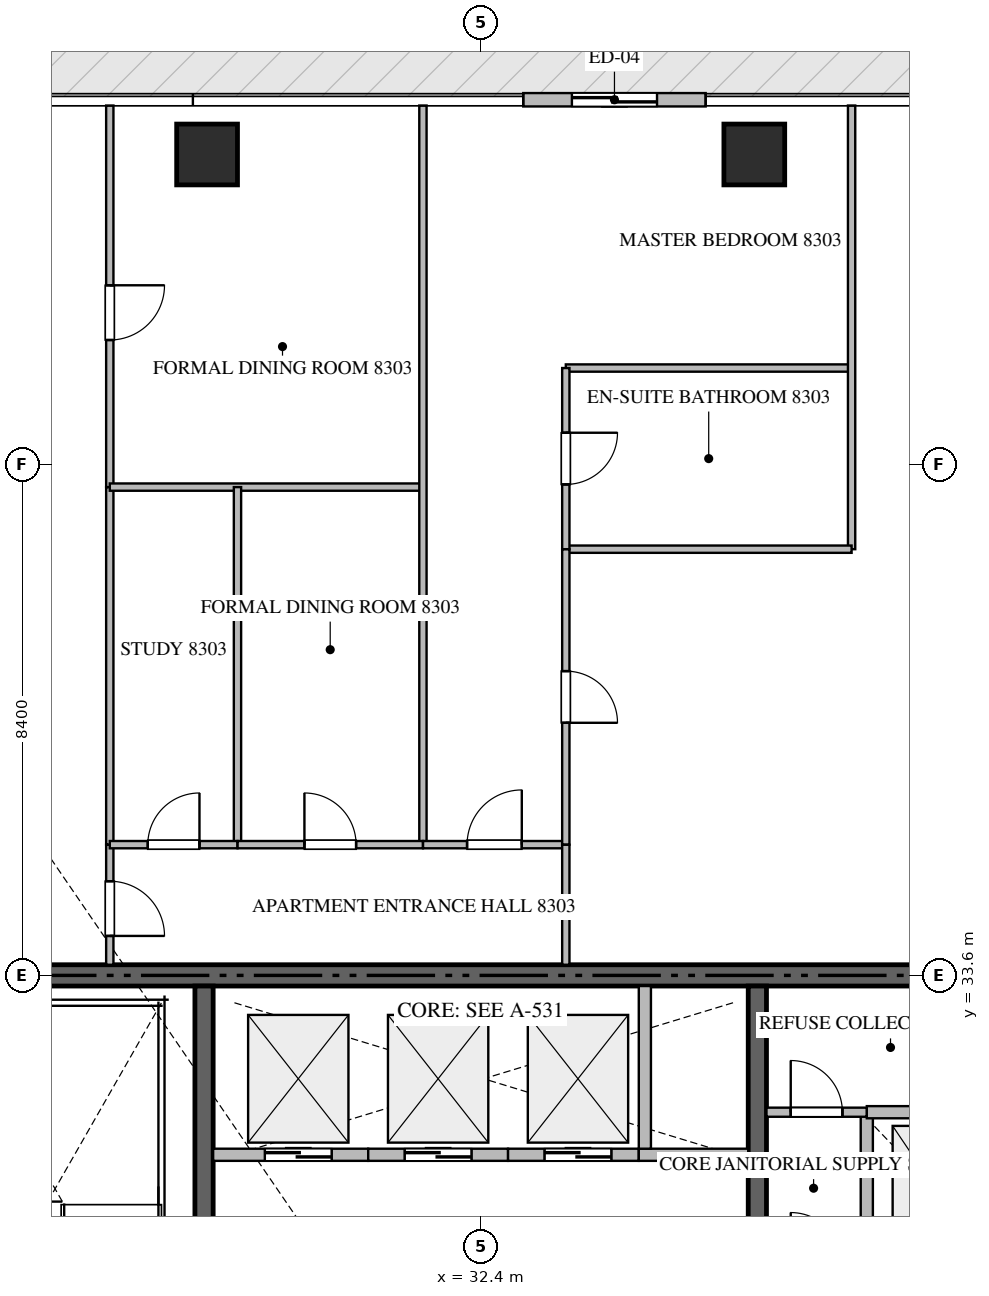
"""IFC4 building model, lengths in metres.
Left out: names, types, materials, properties, quantities, classifications, styles, units other than length and angle.
Written with IfcOpenShell. Run it as: python <this file> out.ifc"""

import sys

from ifc_helpers import new_model, si_unit, direction, frame, frame_2d, origin, origin_2d, place, context, subcontext, project, spatial, rectangle, extrude, source, transform, mapped, element, fill, save


model = new_model("IFC4")
c1 = context("Model", 3, precision=1e-05, world=origin(), true_north=direction((0.0, 1.0)))
c2 = subcontext(c1, "Body", "Model", "MODEL_VIEW")
j1 = project(units=[si_unit("LENGTHUNIT", "METRE"), si_unit("PLANEANGLEUNIT", "RADIAN")], contexts=[c1])
p1 = place(None, origin())
s1 = spatial("IfcSite", under=j1, at=p1, CompositionType="ELEMENT")
p2 = place(p1, origin())
s2 = spatial("IfcBuilding", under=s1, at=p2, CompositionType="ELEMENT")
p3 = place(p2, frame((0.0, 0.0, 333.95)))
s3 = spatial("IfcBuildingStorey", under=s2, at=p3, CompositionType="ELEMENT", Elevation=333.95)
p4 = place(p3, frame((41.4, 33.6, -0.26), z_axis=(0.0, 0.0, 1.0), x_axis=(-1.0, 0.0, 0.0)))
e1 = element("IfcWall", 1, at=p4, inside=s3, PredefinedType="SHEAR", context=c2, shape_type="SweptSolid", body=[
    extrude(rectangle(XDim=18.0, YDim=0.35, at=frame_2d((9.0, 0.0))), origin(), (0.0, 0.0, 1.0), 3.868),
])
p5 = place(p3, frame((27.85, 23.55, -0.26), z_axis=(0.0, 0.0, 1.0), x_axis=(0.0, 1.0, 0.0)))
e2 = element("IfcWall", 2, at=p5, inside=s3, PredefinedType="SHEAR", context=c2, shape_type="SweptSolid", body=[
    extrude(rectangle(XDim=9.875, YDim=0.3, at=frame_2d((4.938, 0.0))), origin(), (0.0, 0.0, 1.0), 3.868),
])
p6 = place(p3, frame((36.95, 27.05, -0.26), z_axis=(0.0, 0.0, 1.0), x_axis=(0.0, 1.0, 0.0)))
e3 = element("IfcWall", 3, at=p6, inside=s3, PredefinedType="SHEAR", context=c2, shape_type="SweptSolid", body=[
    extrude(rectangle(XDim=6.375, YDim=0.3, at=frame_2d((3.188, 0.0))), origin(), (0.0, 0.0, 1.0), 3.868),
])
m1 = source(origin(), c2, "Body", "SweptSolid", [
    extrude(rectangle(XDim=1.0, YDim=1.0, at=origin_2d()), origin(), (0.0, 0.0, 1.0), 3.87),
])
for number, where, z_axis, x_axis in (
    (4, (27.9, 47.1, -0.26), (0.0, 0.0, 1.0), (1.0, 0.0, 0.0)),
    (5, (36.9, 47.1, -0.26), (0.0, 0.0, 1.0), (1.0, 0.0, 0.0)),
):
    element("IfcColumn", number, at=place(p3, frame(where, z_axis=z_axis, x_axis=x_axis)), inside=s3, PredefinedType="COLUMN", context=c2, shape_type="MappedRepresentation", body=[
        mapped(m1, transform((0.0, 0.0, 0.0), scale=1.0)),
    ])
p7 = place(p3, frame((36.1, 48.0, 0.0), z_axis=(0.0, 0.0, 1.0), x_axis=(-1.0, 0.0, 0.0)))
e6 = element("IfcWall", 6, at=p7, inside=s3, PredefinedType="ELEMENTEDWALL", context=c2, shape_type="SweptSolid", body=[
    extrude(rectangle(XDim=3.0, YDim=0.22, at=frame_2d((1.5, 0.0))), origin(), (0.0, 0.0, 1.0), 3.595),
])
p8 = place(p7, frame((0.8, 0.0, 0.0)))
e7 = element("IfcOpeningElement", 7, at=p8, cuts=e6, PredefinedType="OPENING", context=c2, shape_type="SweptSolid", body=[
    extrude(rectangle(XDim=1.4, YDim=2.25, at=frame_2d((0.7, 1.125))), frame((0.0, 0.12, 0.0), z_axis=(0.0, -1.0, 0.0), x_axis=(1.0, 0.0, 0.0)), (0.0, 0.0, 1.0), 0.24),
])
p9 = place(p3, frame((28.0, 30.65, 0.0), z_axis=(0.0, 0.0, 1.0), x_axis=(1.0, 0.0, 0.0)))
e8 = element("IfcWall", 8, at=p9, inside=s3, PredefinedType="STANDARD", context=c2, shape_type="SweptSolid", body=[
    extrude(rectangle(XDim=2.55, YDim=0.2, at=frame_2d((1.275, 0.0))), origin(), (0.0, 0.0, 1.0), 3.61),
])
p10 = place(p9, frame((0.85, 0.0, 0.0)))
e9 = element("IfcOpeningElement", 9, at=p10, cuts=e8, PredefinedType="OPENING", context=c2, shape_type="SweptSolid", body=[
    extrude(rectangle(XDim=1.1, YDim=2.2, at=frame_2d((0.55, 1.1))), frame((0.0, 0.11, 0.0), z_axis=(0.0, -1.0, 0.0), x_axis=(1.0, 0.0, 0.0)), (0.0, 0.0, 1.0), 0.22),
])
p11 = place(p3, frame((30.55, 30.65, 0.0), z_axis=(0.0, 0.0, 1.0), x_axis=(1.0, 0.0, 0.0)))
e10 = element("IfcWall", 10, at=p11, inside=s3, PredefinedType="STANDARD", context=c2, shape_type="SweptSolid", body=[
    extrude(rectangle(XDim=2.3, YDim=0.2, at=frame_2d((1.15, 0.0))), origin(), (0.0, 0.0, 1.0), 3.61),
])
p12 = place(p11, frame((0.6, 0.0, 0.0)))
e11 = element("IfcOpeningElement", 11, at=p12, cuts=e10, PredefinedType="OPENING", context=c2, shape_type="SweptSolid", body=[
    extrude(rectangle(XDim=1.1, YDim=2.2, at=frame_2d((0.55, 1.1))), frame((0.0, 0.11, 0.0), z_axis=(0.0, -1.0, 0.0), x_axis=(1.0, 0.0, 0.0)), (0.0, 0.0, 1.0), 0.22),
])
p13 = place(p3, frame((32.85, 30.65, 0.0), z_axis=(0.0, 0.0, 1.0), x_axis=(1.0, 0.0, 0.0)))
e12 = element("IfcWall", 12, at=p13, inside=s3, PredefinedType="STANDARD", context=c2, shape_type="SweptSolid", body=[
    extrude(rectangle(XDim=2.15, YDim=0.2, at=frame_2d((1.075, 0.0))), origin(), (0.0, 0.0, 1.0), 3.61),
])
p14 = place(p13, frame((0.6, 0.0, 0.0)))
e13 = element("IfcOpeningElement", 13, at=p14, cuts=e12, PredefinedType="OPENING", context=c2, shape_type="SweptSolid", body=[
    extrude(rectangle(XDim=1.1, YDim=2.2, at=frame_2d((0.55, 1.1))), frame((0.0, 0.11, 0.0), z_axis=(0.0, -1.0, 0.0), x_axis=(1.0, 0.0, 0.0)), (0.0, 0.0, 1.0), 0.22),
])
p15 = place(p3, frame((35.0, 30.65, 0.0), z_axis=(0.0, 0.0, 1.0), x_axis=(1.0, 0.0, 0.0)))
e14 = element("IfcWall", 14, at=p15, inside=s3, PredefinedType="STANDARD", context=c2, shape_type="SweptSolid", body=[
    extrude(rectangle(XDim=1.8, YDim=0.2, at=frame_2d((0.9, 0.0))), origin(), (0.0, 0.0, 1.0), 3.61),
])
p16 = place(p3, frame((35.1, 30.75, 0.0), z_axis=(0.0, 0.0, 1.0), x_axis=(0.0, 1.0, 0.0)))
e15 = element("IfcWall", 15, at=p16, inside=s3, PredefinedType="STANDARD", context=c2, shape_type="SweptSolid", body=[
    extrude(rectangle(XDim=2.675, YDim=0.2, at=frame_2d((1.337, 0.0))), origin(), (0.0, 0.0, 1.0), 3.61),
])
p17 = place(p3, frame((38.75, 28.85, 0.0), z_axis=(0.0, 0.0, 1.0), x_axis=(0.0, 1.0, 0.0)))
e16 = element("IfcWall", 16, at=p17, inside=s3, PredefinedType="STANDARD", context=c2, shape_type="SweptSolid", body=[
    extrude(rectangle(XDim=2.5, YDim=0.2, at=frame_2d((1.25, 0.0))), origin(), (0.0, 0.0, 1.0), 3.61),
])
p18 = place(p3, frame((38.75, 31.35, 0.0), z_axis=(0.0, 0.0, 1.0), x_axis=(1.0, 0.0, 0.0)))
e17 = element("IfcWall", 17, at=p18, inside=s3, PredefinedType="STANDARD", context=c2, shape_type="SweptSolid", body=[
    extrude(rectangle(XDim=2.475, YDim=0.2, at=frame_2d((1.238, 0.0))), origin(), (0.0, 0.0, 1.0), 3.61),
])
p19 = place(p3, frame((37.1, 31.35, 0.0), z_axis=(0.0, 0.0, 1.0), x_axis=(1.0, 0.0, 0.0)))
e18 = element("IfcWall", 18, at=p19, inside=s3, PredefinedType="PARTITIONING", context=c2, shape_type="SweptSolid", body=[
    extrude(rectangle(XDim=1.648, YDim=0.15, at=frame_2d((0.824, 0.0))), origin(), (0.0, 0.0, 1.0), 3.61),
])
p20 = place(p19, frame((0.399, 0.0, 0.0)))
e19 = element("IfcOpeningElement", 19, at=p20, cuts=e18, PredefinedType="OPENING", context=c2, shape_type="SweptSolid", body=[
    extrude(rectangle(XDim=0.85, YDim=2.1, at=frame_2d((0.425, 1.05))), frame((0.0, 0.085, 0.0), z_axis=(0.0, -1.0, 0.0), x_axis=(1.0, 0.0, 0.0)), (0.0, 0.0, 1.0), 0.17),
])
p21 = place(p3, frame((26.3, 35.75, 0.0), z_axis=(0.0, 0.0, 1.0), x_axis=(0.0, -1.0, 0.0)))
e20 = element("IfcWall", 20, at=p21, inside=s3, PredefinedType="PARTITIONING", context=c2, shape_type="SweptSolid", body=[
    extrude(rectangle(XDim=1.975, YDim=0.12, at=frame_2d((0.988, 0.0))), origin(), (0.0, 0.0, 1.0), 3.61),
])
p22 = place(p21, frame((0.601, 0.0, 0.0)))
e21 = element("IfcOpeningElement", 21, at=p22, cuts=e20, PredefinedType="OPENING", context=c2, shape_type="SweptSolid", body=[
    extrude(rectangle(XDim=0.9, YDim=2.1, at=frame_2d((0.45, 1.05))), frame((0.0, 0.07, 0.0), z_axis=(0.0, -1.0, 0.0), x_axis=(1.0, 0.0, 0.0)), (0.0, 0.0, 1.0), 0.14),
])
p23 = place(p3, frame((26.3, 47.905, 0.0), z_axis=(0.0, 0.0, 1.0), x_axis=(0.0, -1.0, 0.0)))
e22 = element("IfcWall", 22, at=p23, inside=s3, PredefinedType="PARTITIONING", context=c2, shape_type="SweptSolid", body=[
    extrude(rectangle(XDim=6.275, YDim=0.12, at=frame_2d((3.138, 0.0))), origin(), (0.0, 0.0, 1.0), 3.61),
])
p24 = place(p23, frame((2.956, 0.0, 0.0)))
e23 = element("IfcOpeningElement", 23, at=p24, cuts=e22, PredefinedType="OPENING", context=c2, shape_type="SweptSolid", body=[
    extrude(rectangle(XDim=0.9, YDim=2.1, at=frame_2d((0.45, 1.05))), frame((0.0, 0.07, 0.0), z_axis=(0.0, -1.0, 0.0), x_axis=(1.0, 0.0, 0.0)), (0.0, 0.0, 1.0), 0.14),
])
p25 = place(p3, frame((26.3, 41.628, 0.0), z_axis=(0.0, 0.0, 1.0), x_axis=(0.0, -1.0, 0.0)))
e24 = element("IfcWall", 24, at=p25, inside=s3, PredefinedType="PARTITIONING", context=c2, shape_type="SweptSolid", body=[
    extrude(rectangle(XDim=5.876, YDim=0.12, at=frame_2d((2.938, 0.0))), origin(), (0.0, 0.0, 1.0), 3.61),
])
p26 = place(p3, frame((26.3, 41.63, 0.0), z_axis=(0.0, 0.0, 1.0), x_axis=(1.0, 0.0, 0.0)))
e25 = element("IfcWall", 25, at=p26, inside=s3, PredefinedType="PARTITIONING", context=c2, shape_type="SweptSolid", body=[
    extrude(rectangle(XDim=5.15, YDim=0.12, at=frame_2d((2.575, 0.0))), origin(), (0.0, 0.0, 1.0), 3.61),
])
p27 = place(p3, frame((31.45, 47.905, 0.0), z_axis=(0.0, 0.0, 1.0), x_axis=(0.0, -1.0, 0.0)))
e26 = element("IfcWall", 26, at=p27, inside=s3, PredefinedType="PARTITIONING", context=c2, shape_type="SweptSolid", body=[
    extrude(rectangle(XDim=12.155, YDim=0.12, at=frame_2d((6.078, 0.0))), origin(), (0.0, 0.0, 1.0), 3.61),
])
p28 = place(p3, frame((28.4, 41.63, 0.0), z_axis=(0.0, 0.0, 1.0), x_axis=(0.0, -1.0, 0.0)))
e27 = element("IfcWall", 27, at=p28, inside=s3, PredefinedType="PARTITIONING", context=c2, shape_type="SweptSolid", body=[
    extrude(rectangle(XDim=5.88, YDim=0.12, at=frame_2d((2.94, 0.0))), origin(), (0.0, 0.0, 1.0), 2.445),
])
p29 = place(p3, frame((26.3, 35.75, 0.0), z_axis=(0.0, 0.0, 1.0), x_axis=(1.0, 0.0, 0.0)))
e28 = element("IfcWall", 28, at=p29, inside=s3, PredefinedType="PARTITIONING", context=c2, shape_type="SweptSolid", body=[
    extrude(rectangle(XDim=2.1, YDim=0.12, at=frame_2d((1.05, 0.0))), origin(), (0.0, 0.0, 1.0), 3.61),
])
p30 = place(p29, frame((0.625, 0.0, 0.0)))
e29 = element("IfcOpeningElement", 29, at=p30, cuts=e28, PredefinedType="OPENING", context=c2, shape_type="SweptSolid", body=[
    extrude(rectangle(XDim=0.85, YDim=2.1, at=frame_2d((0.425, 1.05))), frame((0.0, 0.07, 0.0), z_axis=(0.0, -1.0, 0.0), x_axis=(1.0, 0.0, 0.0)), (0.0, 0.0, 1.0), 0.14),
])
p31 = place(p3, frame((28.402, 35.75, 0.0), z_axis=(0.0, 0.0, 1.0), x_axis=(1.0, 0.0, 0.0)))
e30 = element("IfcWall", 30, at=p31, inside=s3, PredefinedType="PARTITIONING", context=c2, shape_type="SweptSolid", body=[
    extrude(rectangle(XDim=3.048, YDim=0.12, at=frame_2d((1.524, 0.0))), origin(), (0.0, 0.0, 1.0), 3.61),
])
p32 = place(p31, frame((1.099, 0.0, 0.0)))
e31 = element("IfcOpeningElement", 31, at=p32, cuts=e30, PredefinedType="OPENING", context=c2, shape_type="SweptSolid", body=[
    extrude(rectangle(XDim=0.85, YDim=2.1, at=frame_2d((0.425, 1.05))), frame((0.0, 0.07, 0.0), z_axis=(0.0, -1.0, 0.0), x_axis=(1.0, 0.0, 0.0)), (0.0, 0.0, 1.0), 0.14),
])
p33 = place(p3, frame((31.452, 35.75, 0.0), z_axis=(0.0, 0.0, 1.0), x_axis=(1.0, 0.0, 0.0)))
e32 = element("IfcWall", 32, at=p33, inside=s3, PredefinedType="PARTITIONING", context=c2, shape_type="SweptSolid", body=[
    extrude(rectangle(XDim=2.348, YDim=0.12, at=frame_2d((1.174, 0.0))), origin(), (0.0, 0.0, 1.0), 3.61),
])
p34 = place(p33, frame((0.724, 0.0, 0.0)))
e33 = element("IfcOpeningElement", 33, at=p34, cuts=e32, PredefinedType="OPENING", context=c2, shape_type="SweptSolid", body=[
    extrude(rectangle(XDim=0.9, YDim=2.1, at=frame_2d((0.45, 1.05))), frame((0.0, 0.07, 0.0), z_axis=(0.0, -1.0, 0.0), x_axis=(1.0, 0.0, 0.0)), (0.0, 0.0, 1.0), 0.14),
])
p35 = place(p3, frame((33.8, 43.588, 0.0), z_axis=(0.0, 0.0, 1.0), x_axis=(1.0, 0.0, 0.0)))
e34 = element("IfcWall", 34, at=p35, inside=s3, PredefinedType="PARTITIONING", context=c2, shape_type="SweptSolid", body=[
    extrude(rectangle(XDim=4.7, YDim=0.12, at=frame_2d((2.35, 0.0))), origin(), (0.0, 0.0, 1.0), 3.61),
])
p36 = place(p3, frame((38.5, 47.905, 0.0), z_axis=(0.0, 0.0, 1.0), x_axis=(0.0, -1.0, 0.0)))
e35 = element("IfcWall", 35, at=p36, inside=s3, PredefinedType="PARTITIONING", context=c2, shape_type="SweptSolid", body=[
    extrude(rectangle(XDim=7.296, YDim=0.12, at=frame_2d((3.648, 0.0))), origin(), (0.0, 0.0, 1.0), 3.61),
])
p37 = place(p3, frame((33.8, 40.609, 0.0), z_axis=(0.0, 0.0, 1.0), x_axis=(1.0, 0.0, 0.0)))
e36 = element("IfcWall", 36, at=p37, inside=s3, PredefinedType="PARTITIONING", context=c2, shape_type="SweptSolid", body=[
    extrude(rectangle(XDim=4.7, YDim=0.12, at=frame_2d((2.35, 0.0))), origin(), (0.0, 0.0, 1.0), 3.61),
])
p38 = place(p3, frame((33.8, 43.588, 0.0), z_axis=(0.0, 0.0, 1.0), x_axis=(0.0, -1.0, 0.0)))
e37 = element("IfcWall", 37, at=p38, inside=s3, PredefinedType="PARTITIONING", context=c2, shape_type="SweptSolid", body=[
    extrude(rectangle(XDim=2.979, YDim=0.12, at=frame_2d((1.49, 0.0))), origin(), (0.0, 0.0, 1.0), 3.61),
])
p39 = place(p38, frame((1.064, 0.0, 0.0)))
e38 = element("IfcOpeningElement", 38, at=p39, cuts=e37, PredefinedType="OPENING", context=c2, shape_type="SweptSolid", body=[
    extrude(rectangle(XDim=0.85, YDim=2.1, at=frame_2d((0.425, 1.05))), frame((0.0, 0.07, 0.0), z_axis=(0.0, -1.0, 0.0), x_axis=(1.0, 0.0, 0.0)), (0.0, 0.0, 1.0), 0.14),
])
p40 = place(p3, frame((33.8, 40.607, 0.0), z_axis=(0.0, 0.0, 1.0), x_axis=(0.0, -1.0, 0.0)))
e39 = element("IfcWall", 39, at=p40, inside=s3, PredefinedType="PARTITIONING", context=c2, shape_type="SweptSolid", body=[
    extrude(rectangle(XDim=4.857, YDim=0.12, at=frame_2d((2.428, 0.0))), origin(), (0.0, 0.0, 1.0), 3.61),
])
p41 = place(p40, frame((2.003, 0.0, 0.0)))
e40 = element("IfcOpeningElement", 40, at=p41, cuts=e39, PredefinedType="OPENING", context=c2, shape_type="SweptSolid", body=[
    extrude(rectangle(XDim=0.85, YDim=2.1, at=frame_2d((0.425, 1.05))), frame((0.0, 0.07, 0.0), z_axis=(0.0, -1.0, 0.0), x_axis=(1.0, 0.0, 0.0)), (0.0, 0.0, 1.0), 0.14),
])
p42 = place(p3, frame((33.8, 35.748, 0.0), z_axis=(0.0, 0.0, 1.0), x_axis=(0.0, -1.0, 0.0)))
e41 = element("IfcWall", 41, at=p42, inside=s3, PredefinedType="PARTITIONING", context=c2, shape_type="SweptSolid", body=[
    extrude(rectangle(XDim=1.973, YDim=0.12, at=frame_2d((0.987, 0.0))), origin(), (0.0, 0.0, 1.0), 3.61),
])
m2 = source(origin(), c2, "Body", "SweptSolid", [
    extrude(rectangle(XDim=1.4, YDim=2.25, at=frame_2d((0.7, 1.125))), frame((0.0, 0.025, 0.0), z_axis=(0.0, -1.0, 0.0), x_axis=(1.0, 0.0, 0.0)), (0.0, 0.0, 1.0), 0.05),
])
p43 = place(p8, origin())
e42 = element("IfcDoor", 42, at=p43, inside=s3, OperationType="SLIDING_TO_LEFT", PredefinedType="DOOR", context=c2, shape_type="MappedRepresentation", body=[
    mapped(m2, transform((0.0, 0.0, 0.0), scale=1.0)),
])
fill(e7, e42)
m3 = source(origin(), c2, "Body", "SweptSolid", [
    extrude(rectangle(XDim=1.1, YDim=2.2, at=frame_2d((0.55, 1.1))), frame((0.0, 0.025, 0.0), z_axis=(0.0, -1.0, 0.0), x_axis=(1.0, 0.0, 0.0)), (0.0, 0.0, 1.0), 0.05),
])
p44 = place(p10, origin())
e43 = element("IfcDoor", 43, at=p44, inside=s3, OperationType="DOUBLE_DOOR_SLIDING", PredefinedType="DOOR", context=c2, shape_type="MappedRepresentation", body=[
    mapped(m3, transform((0.0, 0.0, 0.0), scale=1.0)),
])
fill(e9, e43)
p45 = place(p12, origin())
e44 = element("IfcDoor", 44, at=p45, inside=s3, OperationType="DOUBLE_DOOR_SLIDING", PredefinedType="DOOR", context=c2, shape_type="MappedRepresentation", body=[
    mapped(m3, transform((0.0, 0.0, 0.0), scale=1.0)),
])
fill(e11, e44)
p46 = place(p14, origin())
e45 = element("IfcDoor", 45, at=p46, inside=s3, OperationType="DOUBLE_DOOR_SLIDING", PredefinedType="DOOR", context=c2, shape_type="MappedRepresentation", body=[
    mapped(m3, transform((0.0, 0.0, 0.0), scale=1.0)),
])
fill(e13, e45)
m4 = source(origin(), c2, "Body", "SweptSolid", [
    extrude(rectangle(XDim=0.85, YDim=2.1, at=frame_2d((0.425, 1.05))), frame((0.0, 0.025, 0.0), z_axis=(0.0, -1.0, 0.0), x_axis=(1.0, 0.0, 0.0)), (0.0, 0.0, 1.0), 0.05),
])
p47 = place(p20, origin())
e46 = element("IfcDoor", 46, at=p47, inside=s3, OperationType="SINGLE_SWING_LEFT", PredefinedType="DOOR", context=c2, shape_type="MappedRepresentation", body=[
    mapped(m4, transform((0.0, 0.0, 0.0), scale=1.0)),
])
fill(e19, e46)
m5 = source(origin(), c2, "Body", "SweptSolid", [
    extrude(rectangle(XDim=0.9, YDim=2.1, at=frame_2d((0.45, 1.05))), frame((0.0, 0.025, 0.0), z_axis=(0.0, -1.0, 0.0), x_axis=(1.0, 0.0, 0.0)), (0.0, 0.0, 1.0), 0.05),
])
p48 = place(p22, origin())
e47 = element("IfcDoor", 47, at=p48, inside=s3, OperationType="SINGLE_SWING_RIGHT", PredefinedType="DOOR", context=c2, shape_type="MappedRepresentation", body=[
    mapped(m5, transform((0.0, 0.0, 0.0), scale=1.0)),
])
fill(e21, e47)
p49 = place(p24, origin())
e48 = element("IfcDoor", 48, at=p49, inside=s3, OperationType="SINGLE_SWING_LEFT", PredefinedType="DOOR", context=c2, shape_type="MappedRepresentation", body=[
    mapped(m5, transform((0.0, 0.0, 0.0), scale=1.0)),
])
fill(e23, e48)
p50 = place(p30, origin())
e49 = element("IfcDoor", 49, at=p50, inside=s3, OperationType="SINGLE_SWING_RIGHT", PredefinedType="DOOR", context=c2, shape_type="MappedRepresentation", body=[
    mapped(m4, transform((0.0, 0.0, 0.0), scale=1.0)),
])
fill(e29, e49)
p51 = place(p32, origin())
e50 = element("IfcDoor", 50, at=p51, inside=s3, OperationType="SINGLE_SWING_LEFT", PredefinedType="DOOR", context=c2, shape_type="MappedRepresentation", body=[
    mapped(m4, transform((0.0, 0.0, 0.0), scale=1.0)),
])
fill(e31, e50)
p52 = place(p34, origin())
e51 = element("IfcDoor", 51, at=p52, inside=s3, OperationType="SINGLE_SWING_RIGHT", PredefinedType="DOOR", context=c2, shape_type="MappedRepresentation", body=[
    mapped(m5, transform((0.0, 0.0, 0.0), scale=1.0)),
])
fill(e33, e51)
p53 = place(p39, origin())
e52 = element("IfcDoor", 52, at=p53, inside=s3, OperationType="SINGLE_SWING_LEFT", PredefinedType="DOOR", context=c2, shape_type="MappedRepresentation", body=[
    mapped(m4, transform((0.0, 0.0, 0.0), scale=1.0)),
])
fill(e38, e52)
p54 = place(p41, origin())
e53 = element("IfcDoor", 53, at=p54, inside=s3, OperationType="SINGLE_SWING_RIGHT", PredefinedType="DOOR", context=c2, shape_type="MappedRepresentation", body=[
    mapped(m4, transform((0.0, 0.0, 0.0), scale=1.0)),
])
fill(e40, e53)
save(model, sys.argv[1])
